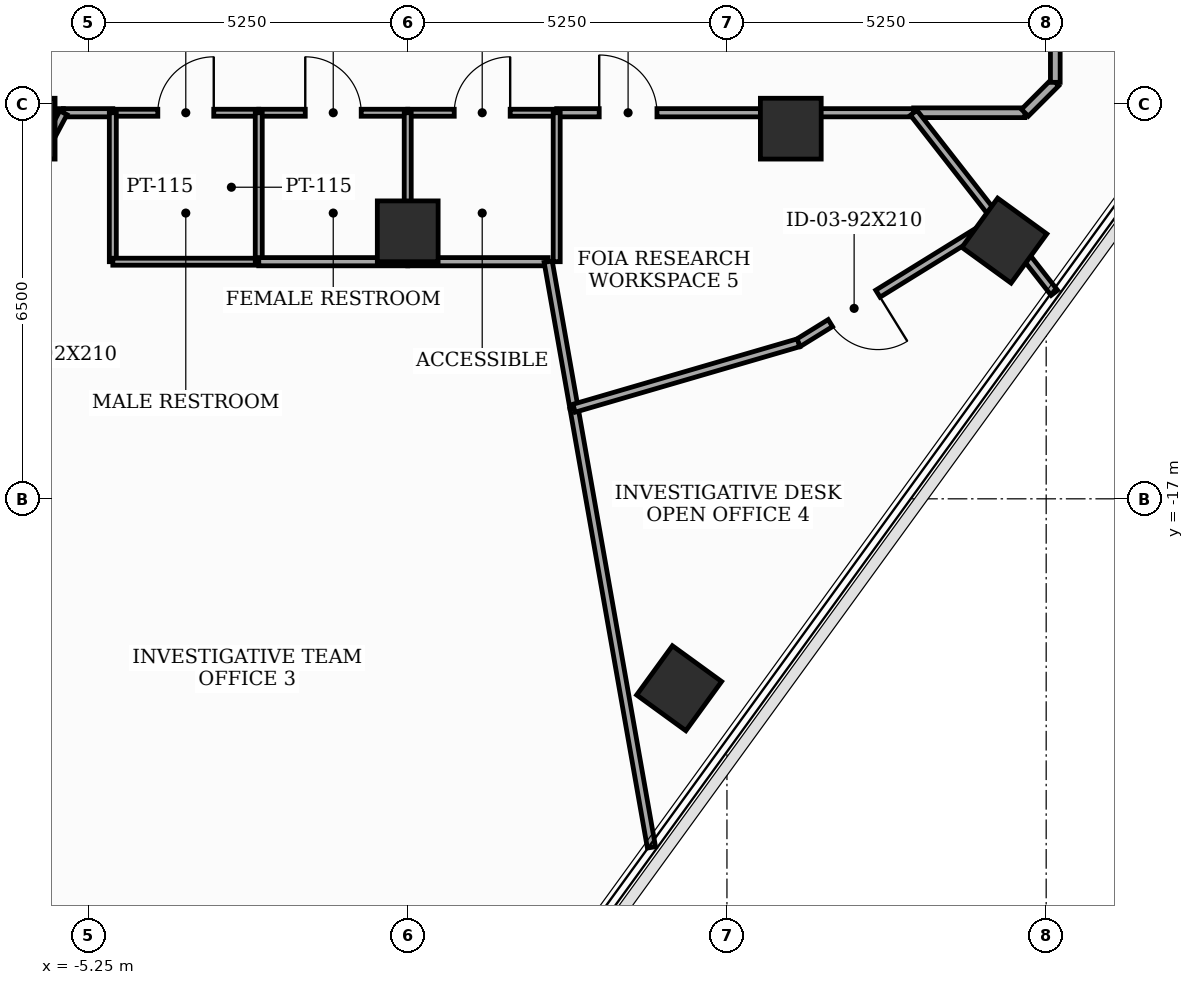
"""IFC4 building model, lengths in metres.
Left out: names, types, materials, properties, quantities, classifications, styles, units other than length and angle.
Written with IfcOpenShell. Run it as: python <this file> out.ifc"""

import sys

from ifc_helpers import new_model, si_unit, direction, frame, frame_2d, origin, origin_2d, place, context, subcontext, project, spatial, rectangle, extrude, element, fill, save


model = new_model("IFC4")
c1 = context("Model", 3, precision=1e-05, world=origin(), true_north=direction((0.0, 1.0)))
c2 = subcontext(c1, "Body", "Model", "MODEL_VIEW")
j1 = project(units=[si_unit("LENGTHUNIT", "METRE"), si_unit("PLANEANGLEUNIT", "RADIAN")], contexts=[c1])
p1 = place(None, origin())
s1 = spatial("IfcSite", under=j1, at=p1, CompositionType="ELEMENT")
p2 = place(p1, origin())
s2 = spatial("IfcBuilding", under=s1, at=p2, CompositionType="ELEMENT")
p3 = place(p2, frame((0.0, 0.0, 233.7)))
s3 = spatial("IfcBuildingStorey", under=s2, at=p3, CompositionType="ELEMENT", Elevation=233.7)
for number, where, z_axis, x_axis in (
    (1, (-6.3, -10.912, 0.0), (0.0, 0.0, 1.0), (1.0, 0.0, 0.0)),
    (2, (0.0, -12.6, 0.0), (0.0, 0.0, 1.0), (1.0, 0.0, 0.0)),
    (3, (6.3, -10.912, 0.0), (0.0, 0.0, 1.0), (1.0, 0.0, 0.0)),
    (4, (4.464, -20.115, 0.0), (0.0, 0.0, 1.0), (0.588, 0.809, 0.0)),
    (5, (9.812, -12.753, 0.0), (0.0, 0.0, 1.0), (0.588, 0.809, 0.0)),
):
    element("IfcColumn", number, at=place(p3, frame(where, z_axis=z_axis, x_axis=x_axis)), inside=s3, PredefinedType="COLUMN", context=c2, shape_type="SweptSolid", body=[
        extrude(rectangle(XDim=1.0, YDim=1.0, at=origin_2d()), origin(), (0.0, 0.0, 1.0), 3.7),
    ])
p4 = place(p3, frame((-10.15, -10.65, 0.0), z_axis=(0.0, 0.0, 1.0), x_axis=(1.0, 0.0, 0.0)))
e6 = element("IfcWall", 6, at=p4, inside=s3, PredefinedType="PARTITIONING", context=c2, shape_type="SweptSolid", body=[
    extrude(rectangle(XDim=4.487, YDim=0.135, at=frame_2d((2.243, 0.0))), origin(), (0.0, 0.0, 1.0), 2.885),
])
p5 = place(p4, frame((0.781, 0.0, 0.0)))
e7 = element("IfcOpeningElement", 7, at=p5, cuts=e6, PredefinedType="OPENING", context=c2, shape_type="SweptSolid", body=[
    extrude(rectangle(XDim=0.95, YDim=2.1, at=frame_2d((0.475, 1.05))), frame((0.0, 0.077, 0.0), z_axis=(0.0, -1.0, 0.0), x_axis=(1.0, 0.0, 0.0)), (0.0, 0.0, 1.0), 0.155),
])
p6 = place(p3, frame((-4.85, -10.65, 0.0), z_axis=(0.0, 0.0, 1.0), x_axis=(1.0, 0.0, 0.0)))
e8 = element("IfcWall", 8, at=p6, inside=s3, PredefinedType="PARTITIONING", context=c2, shape_type="SweptSolid", body=[
    extrude(rectangle(XDim=2.4, YDim=0.115, at=frame_2d((1.2, 0.0))), origin(), (0.0, 0.0, 1.0), 3.5),
])
p7 = place(p6, frame((0.74, 0.0, 0.0)))
e9 = element("IfcOpeningElement", 9, at=p7, cuts=e8, PredefinedType="OPENING", context=c2, shape_type="SweptSolid", body=[
    extrude(rectangle(XDim=0.92, YDim=2.1, at=frame_2d((0.46, 1.05))), frame((0.0, 0.067, 0.0), z_axis=(0.0, -1.0, 0.0), x_axis=(1.0, 0.0, 0.0)), (0.0, 0.0, 1.0), 0.135),
])
p8 = place(p3, frame((-5.663, -10.65, 0.0), z_axis=(0.0, 0.0, 1.0), x_axis=(1.0, 0.0, 0.0)))
e10 = element("IfcWall", 10, at=p8, inside=s3, PredefinedType="PARTITIONING", context=c2, shape_type="SweptSolid", body=[
    extrude(rectangle(XDim=0.813, YDim=0.135, at=frame_2d((0.406, 0.0))), origin(), (0.0, 0.0, 1.0), 3.5),
])
p9 = place(p3, frame((-2.45, -10.65, 0.0), z_axis=(0.0, 0.0, 1.0), x_axis=(1.0, 0.0, 0.0)))
e11 = element("IfcWall", 11, at=p9, inside=s3, PredefinedType="PARTITIONING", context=c2, shape_type="SweptSolid", body=[
    extrude(rectangle(XDim=2.45, YDim=0.115, at=frame_2d((1.225, 0.0))), origin(), (0.0, 0.0, 1.0), 2.885),
])
p10 = place(p9, frame((0.765, 0.0, 0.0)))
e12 = element("IfcOpeningElement", 12, at=p10, cuts=e11, PredefinedType="OPENING", context=c2, shape_type="SweptSolid", body=[
    extrude(rectangle(XDim=0.92, YDim=2.1, at=frame_2d((0.46, 1.05))), frame((0.0, 0.067, 0.0), z_axis=(0.0, -1.0, 0.0), x_axis=(1.0, 0.0, 0.0)), (0.0, 0.0, 1.0), 0.135),
])
p11 = place(p3, frame((0.0, -10.65, 0.0), z_axis=(0.0, 0.0, 1.0), x_axis=(1.0, 0.0, 0.0)))
e13 = element("IfcWall", 13, at=p11, inside=s3, PredefinedType="PARTITIONING", context=c2, shape_type="SweptSolid", body=[
    extrude(rectangle(XDim=2.45, YDim=0.115, at=frame_2d((1.225, 0.0))), origin(), (0.0, 0.0, 1.0), 3.5),
])
p12 = place(p11, frame((0.765, 0.0, 0.0)))
e14 = element("IfcOpeningElement", 14, at=p12, cuts=e13, PredefinedType="OPENING", context=c2, shape_type="SweptSolid", body=[
    extrude(rectangle(XDim=0.92, YDim=2.1, at=frame_2d((0.46, 1.05))), frame((0.0, 0.067, 0.0), z_axis=(0.0, -1.0, 0.0), x_axis=(1.0, 0.0, 0.0)), (0.0, 0.0, 1.0), 0.135),
])
p13 = place(p3, frame((2.45, -10.65, 0.0), z_axis=(0.0, 0.0, 1.0), x_axis=(1.0, 0.0, 0.0)))
e15 = element("IfcWall", 15, at=p13, inside=s3, PredefinedType="PARTITIONING", context=c2, shape_type="SweptSolid", body=[
    extrude(rectangle(XDim=5.871, YDim=0.135, at=frame_2d((2.936, 0.0))), origin(), (0.0, 0.0, 1.0), 2.885),
])
p14 = place(p13, frame((0.699, 0.0, 0.0)))
e16 = element("IfcOpeningElement", 16, at=p14, cuts=e15, PredefinedType="OPENING", context=c2, shape_type="SweptSolid", body=[
    extrude(rectangle(XDim=0.95, YDim=2.1, at=frame_2d((0.475, 1.05))), frame((0.0, 0.077, 0.0), z_axis=(0.0, -1.0, 0.0), x_axis=(1.0, 0.0, 0.0)), (0.0, 0.0, 1.0), 0.155),
])
p15 = place(p3, frame((8.321, -10.65, 0.0), z_axis=(0.0, 0.0, 1.0), x_axis=(1.0, 0.0, 0.0)))
e17 = element("IfcWall", 17, at=p15, inside=s3, PredefinedType="PARTITIONING", context=c2, shape_type="SweptSolid", body=[
    extrude(rectangle(XDim=1.829, YDim=0.16, at=frame_2d((0.915, 0.0))), origin(), (0.0, 0.0, 1.0), 3.5),
])
p16 = place(p3, frame((10.15, -10.65, 0.0), z_axis=(0.0, 0.0, 1.0), x_axis=(0.707106781187, 0.707106781187, 0.0)))
e18 = element("IfcWall", 18, at=p16, inside=s3, PredefinedType="PARTITIONING", context=c2, shape_type="SweptSolid", body=[
    extrude(rectangle(XDim=0.707, YDim=0.16, at=frame_2d((0.354, 0.0))), origin(), (0.0, 0.0, 1.0), 3.5),
])
p17 = place(p3, frame((10.65, -10.15, 0.0), z_axis=(0.0, 0.0, 1.0), x_axis=(0.0, 1.0, 0.0)))
e19 = element("IfcWall", 19, at=p17, inside=s3, PredefinedType="PARTITIONING", context=c2, shape_type="SweptSolid", body=[
    extrude(rectangle(XDim=5.408, YDim=0.16, at=frame_2d((2.704, 0.0))), origin(), (0.0, 0.0, 1.0), 2.885),
])
p18 = place(p17, frame((0.582, 0.0, 0.0)))
e20 = element("IfcOpeningElement", 20, at=p18, cuts=e19, PredefinedType="OPENING", context=c2, shape_type="SweptSolid", body=[
    extrude(rectangle(XDim=1.0, YDim=2.15, at=frame_2d((0.5, 1.075))), frame((0.0, 0.09, 0.0), z_axis=(0.0, -1.0, 0.0), x_axis=(1.0, 0.0, 0.0)), (0.0, 0.0, 1.0), 0.18),
])
p19 = place(p3, frame((-9.893, -18.605, 0.0), z_axis=(0.0, 0.0, 1.0), x_axis=(0.469478145305, 0.88294409284, 0.0)))
e21 = element("IfcWall", 21, at=p19, inside=s3, PredefinedType="PARTITIONING", context=c2, shape_type="SweptSolid", body=[
    extrude(rectangle(XDim=9.01, YDim=0.135, at=frame_2d((4.505, 0.0))), origin(), (0.0, 0.0, 1.0), 2.885),
])
p20 = place(p19, frame((4.045, 0.0, 0.0)))
e22 = element("IfcOpeningElement", 22, at=p20, cuts=e21, PredefinedType="OPENING", context=c2, shape_type="SweptSolid", body=[
    extrude(rectangle(XDim=0.92, YDim=2.1, at=frame_2d((0.46, 1.05))), frame((0.0, 0.077, 0.0), z_axis=(0.0, -1.0, 0.0), x_axis=(1.0, 0.0, 0.0)), (0.0, 0.0, 1.0), 0.155),
])
p21 = place(p3, frame((-4.85, -10.65, 0.0), z_axis=(0.0, 0.0, 1.0), x_axis=(0.0, -1.0, 0.0)))
e23 = element("IfcWall", 23, at=p21, inside=s3, PredefinedType="PARTITIONING", context=c2, shape_type="SweptSolid", body=[
    extrude(rectangle(XDim=2.45, YDim=0.115, at=frame_2d((1.225, 0.0))), origin(), (0.0, 0.0, 1.0), 2.885),
])
p22 = place(p3, frame((-4.85, -13.1, 0.0), z_axis=(0.0, 0.0, 1.0), x_axis=(1.0, 0.0, 0.0)))
e24 = element("IfcWall", 24, at=p22, inside=s3, PredefinedType="PARTITIONING", context=c2, shape_type="SweptSolid", body=[
    extrude(rectangle(XDim=2.4, YDim=0.115, at=frame_2d((1.2, 0.0))), origin(), (0.0, 0.0, 1.0), 3.5),
])
p23 = place(p3, frame((-2.45, -13.1, 0.0), z_axis=(0.0, 0.0, 1.0), x_axis=(0.0, 1.0, 0.0)))
e25 = element("IfcWall", 25, at=p23, inside=s3, PredefinedType="PARTITIONING", context=c2, shape_type="SweptSolid", body=[
    extrude(rectangle(XDim=2.45, YDim=0.115, at=frame_2d((1.225, 0.0))), origin(), (0.0, 0.0, 1.0), 2.885),
])
p24 = place(p3, frame((0.0, -13.1, 0.0), z_axis=(0.0, 0.0, 1.0), x_axis=(-1.0, 0.0, 0.0)))
e26 = element("IfcWall", 26, at=p24, inside=s3, PredefinedType="PARTITIONING", context=c2, shape_type="SweptSolid", body=[
    extrude(rectangle(XDim=2.45, YDim=0.135, at=frame_2d((1.225, 0.0))), origin(), (0.0, 0.0, 1.0), 3.5),
])
p25 = place(p3, frame((2.31, -13.1, 0.0), z_axis=(0.0, 0.0, 1.0), x_axis=(-1.0, 0.0, 0.0)))
e27 = element("IfcWall", 27, at=p25, inside=s3, PredefinedType="PARTITIONING", context=c2, shape_type="SweptSolid", body=[
    extrude(rectangle(XDim=2.31, YDim=0.135, at=frame_2d((1.155, 0.0))), origin(), (0.0, 0.0, 1.0), 2.985),
])
p26 = place(p3, frame((4.009, -22.732, 0.0), z_axis=(0.0, 0.0, 1.0), x_axis=(-0.173639103053, 0.984809353068, 0.0)))
e28 = element("IfcWall", 28, at=p26, inside=s3, PredefinedType="PARTITIONING", context=c2, shape_type="SweptSolid", body=[
    extrude(rectangle(XDim=7.334, YDim=0.135, at=frame_2d((3.667, 0.0))), origin(), (0.0, 0.0, 1.0), 2.985),
])
p27 = place(p3, frame((2.735, -15.51, 0.0), z_axis=(0.0, 0.0, 1.0), x_axis=(-0.173694270709, 0.984799624453, 0.0)))
e29 = element("IfcWall", 29, at=p27, inside=s3, PredefinedType="PARTITIONING", context=c2, shape_type="SweptSolid", body=[
    extrude(rectangle(XDim=2.447, YDim=0.135, at=frame_2d((1.224, 0.0))), origin(), (0.0, 0.0, 1.0), 3.5),
])
for number, where, z_axis, x_axis in (
    (30, (0.0, -13.1, 0.0), (0.0, 0.0, 1.0), (0.0, 1.0, 0.0)),
    (31, (2.45, -13.1, 0.0), (0.0, 0.0, 1.0), (0.0, 1.0, 0.0)),
):
    element("IfcWall", number, at=place(p3, frame(where, z_axis=z_axis, x_axis=x_axis)), inside=s3, PredefinedType="PARTITIONING", context=c2, shape_type="SweptSolid", body=[
        extrude(rectangle(XDim=2.45, YDim=0.115, at=frame_2d((1.225, 0.0))), origin(), (0.0, 0.0, 1.0), 2.885),
    ])
p28 = place(p3, frame((9.696, -12.411, 0.0), z_axis=(0.0, 0.0, 1.0), x_axis=(-0.850393663863, -0.526146953295, 0.0)))
e32 = element("IfcWall", 32, at=p28, inside=s3, PredefinedType="PARTITIONING", context=c2, shape_type="SweptSolid", body=[
    extrude(rectangle(XDim=3.845, YDim=0.135, at=frame_2d((1.923, 0.0))), origin(), (0.0, 0.0, 1.0), 2.985),
])
p29 = place(p28, frame((2.309, 0.0, 0.0)))
e33 = element("IfcOpeningElement", 33, at=p29, cuts=e32, PredefinedType="OPENING", context=c2, shape_type="SweptSolid", body=[
    extrude(rectangle(XDim=0.92, YDim=2.1, at=frame_2d((0.46, 1.05))), frame((0.0, 0.077, 0.0), z_axis=(0.0, -1.0, 0.0), x_axis=(1.0, 0.0, 0.0)), (0.0, 0.0, 1.0), 0.155),
])
p30 = place(p3, frame((6.426, -14.434, 0.0), z_axis=(0.0, 0.0, 1.0), x_axis=(-0.960041241254, -0.279858562654, 0.0)))
e34 = element("IfcWall", 34, at=p30, inside=s3, PredefinedType="PARTITIONING", context=c2, shape_type="SweptSolid", body=[
    extrude(rectangle(XDim=3.844, YDim=0.135, at=frame_2d((1.922, 0.0))), origin(), (0.0, 0.0, 1.0), 3.5),
])
p31 = place(p3, frame((10.635, -13.612, 0.0), z_axis=(0.0, 0.0, 1.0), x_axis=(-0.615768345532, 0.787927245779, 0.0)))
e35 = element("IfcWall", 35, at=p31, inside=s3, PredefinedType="PARTITIONING", context=c2, shape_type="SweptSolid", body=[
    extrude(rectangle(XDim=1.524, YDim=0.135, at=frame_2d((0.762, 0.0))), origin(), (0.0, 0.0, 1.0), 2.985),
])
p32 = place(p3, frame((9.696, -12.411, 0.0), z_axis=(0.0, 0.0, 1.0), x_axis=(-0.615429845305, 0.788191668002, 0.0)))
e36 = element("IfcWall", 36, at=p32, inside=s3, PredefinedType="PARTITIONING", context=c2, shape_type="SweptSolid", body=[
    extrude(rectangle(XDim=2.234, YDim=0.135, at=frame_2d((1.117, 0.0))), origin(), (0.0, 0.0, 1.0), 2.985),
])
p33 = place(p7, origin())
e37 = element("IfcDoor", 37, at=p33, inside=s3, OperationType="SINGLE_SWING_RIGHT", PredefinedType="DOOR", context=c2, shape_type="SweptSolid", body=[
    extrude(rectangle(XDim=0.92, YDim=2.1, at=frame_2d((0.46, 1.05))), frame((0.0, 0.025, 0.0), z_axis=(0.0, -1.0, 0.0), x_axis=(1.0, 0.0, 0.0)), (0.0, 0.0, 1.0), 0.05),
])
fill(e9, e37)
p34 = place(p10, origin())
e38 = element("IfcDoor", 38, at=p34, inside=s3, OperationType="SINGLE_SWING_LEFT", PredefinedType="DOOR", context=c2, shape_type="SweptSolid", body=[
    extrude(rectangle(XDim=0.92, YDim=2.1, at=frame_2d((0.46, 1.05))), frame((0.0, 0.025, 0.0), z_axis=(0.0, -1.0, 0.0), x_axis=(1.0, 0.0, 0.0)), (0.0, 0.0, 1.0), 0.05),
])
fill(e12, e38)
p35 = place(p12, origin())
e39 = element("IfcDoor", 39, at=p35, inside=s3, OperationType="SINGLE_SWING_RIGHT", PredefinedType="DOOR", context=c2, shape_type="SweptSolid", body=[
    extrude(rectangle(XDim=0.92, YDim=2.1, at=frame_2d((0.46, 1.05))), frame((0.0, 0.025, 0.0), z_axis=(0.0, -1.0, 0.0), x_axis=(1.0, 0.0, 0.0)), (0.0, 0.0, 1.0), 0.05),
])
fill(e14, e39)
p36 = place(p14, origin())
e40 = element("IfcDoor", 40, at=p36, inside=s3, OperationType="SINGLE_SWING_LEFT", PredefinedType="DOOR", context=c2, shape_type="SweptSolid", body=[
    extrude(rectangle(XDim=0.95, YDim=2.1, at=frame_2d((0.475, 1.05))), frame((0.0, 0.025, 0.0), z_axis=(0.0, -1.0, 0.0), x_axis=(1.0, 0.0, 0.0)), (0.0, 0.0, 1.0), 0.05),
])
fill(e16, e40)
p37 = place(p29, origin())
e41 = element("IfcDoor", 41, at=p37, inside=s3, OperationType="SINGLE_SWING_LEFT", PredefinedType="DOOR", context=c2, shape_type="SweptSolid", body=[
    extrude(rectangle(XDim=0.92, YDim=2.1, at=frame_2d((0.46, 1.05))), frame((0.0, 0.025, 0.0), z_axis=(0.0, -1.0, 0.0), x_axis=(1.0, 0.0, 0.0)), (0.0, 0.0, 1.0), 0.05),
])
fill(e33, e41)
save(model, sys.argv[1])
